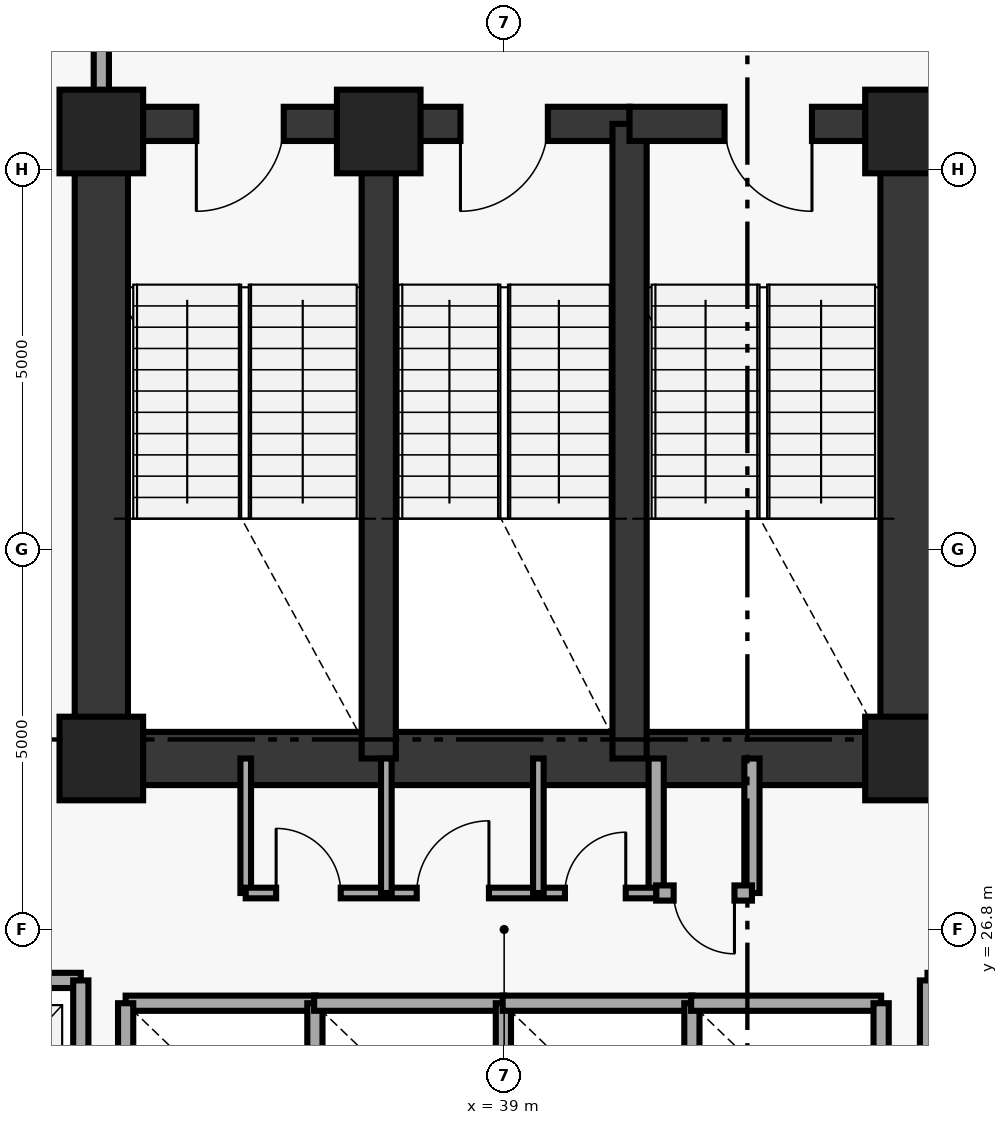
"""IFC4 building model, lengths in metres.
Left out: names, types, materials, properties, quantities, classifications, styles, units other than length and angle.
Written with IfcOpenShell. Run it as: python <this file> out.ifc"""

import sys

from ifc_helpers import new_model, si_unit, direction, frame, frame_2d, origin, origin_2d, place, context, subcontext, project, spatial, rectangle, extrude, element, fill, save


model = new_model("IFC4")
c1 = context("Model", 3, precision=1e-05, world=origin(), true_north=direction((0.0, 1.0)))
c2 = subcontext(c1, "Body", "Model", "MODEL_VIEW")
j1 = project(units=[si_unit("LENGTHUNIT", "METRE"), si_unit("PLANEANGLEUNIT", "RADIAN")], contexts=[c1])
p1 = place(None, origin())
s1 = spatial("IfcSite", under=j1, at=p1, CompositionType="ELEMENT")
p2 = place(p1, origin())
s2 = spatial("IfcBuilding", under=s1, at=p2, CompositionType="ELEMENT")
p3 = place(p2, frame((0.0, 0.0, 102.0)))
s3 = spatial("IfcBuildingStorey", under=s2, at=p3, CompositionType="ELEMENT", Elevation=102.0)
for number, where, z_axis, x_axis in (
    (1, (44.3, 29.05, 0.0), (0.0, 0.0, 1.0), (1.0, 0.0, 0.0)),
    (2, (44.3, 37.3, 0.0), (0.0, 0.0, 1.0), (1.0, 0.0, 0.0)),
    (3, (37.35, 37.3, 0.0), (0.0, 0.0, 1.0), (1.0, 0.0, 0.0)),
    (4, (33.7, 37.3, 0.0), (0.0, 0.0, 1.0), (1.0, 0.0, 0.0)),
    (5, (33.7, 29.05, 0.0), (0.0, 0.0, 1.0), (1.0, 0.0, 0.0)),
):
    element("IfcColumn", number, at=place(p3, frame(where, z_axis=z_axis, x_axis=x_axis)), inside=s3, PredefinedType="PILASTER", context=c2, shape_type="SweptSolid", body=[
        extrude(rectangle(XDim=1.1, YDim=1.1, at=origin_2d()), origin(), (0.0, 0.0, 1.0), 3.7),
    ])
for number, where, z_axis, x_axis in (
    (6, (33.7, 29.05, 0.0), (0.0, 0.0, 1.0), (0.0, 1.0, 0.0)),
    (7, (44.3, 29.05, 0.0), (0.0, 0.0, 1.0), (0.0, 1.0, 0.0)),
):
    element("IfcWall", number, at=place(p3, frame(where, z_axis=z_axis, x_axis=x_axis)), inside=s3, PredefinedType="SHEAR", context=c2, shape_type="SweptSolid", body=[
        extrude(rectangle(XDim=8.35, YDim=0.7, at=frame_2d((4.175, 0.0))), origin(), (0.0, 0.0, 1.0), 3.7),
    ])
p4 = place(p3, frame((33.7, 29.05, 0.0), z_axis=(0.0, 0.0, 1.0), x_axis=(1.0, 0.0, 0.0)))
e8 = element("IfcWall", 8, at=p4, inside=s3, PredefinedType="SHEAR", context=c2, shape_type="SweptSolid", body=[
    extrude(rectangle(XDim=10.6, YDim=0.7, at=frame_2d((5.3, 0.0))), origin(), (0.0, 0.0, 1.0), 3.7),
])
p5 = place(p3, frame((37.35, 37.4, 0.0), z_axis=(0.0, 0.0, 1.0), x_axis=(-1.0, 0.0, 0.0)))
e9 = element("IfcWall", 9, at=p5, inside=s3, PredefinedType="SHEAR", context=c2, shape_type="SweptSolid", body=[
    extrude(rectangle(XDim=3.65, YDim=0.45, at=frame_2d((1.825, 0.0))), origin(), (0.0, 0.0, 1.0), 3.7),
])
p6 = place(p5, frame((1.25, 0.0, 0.0)))
e10 = element("IfcOpeningElement", 10, at=p6, cuts=e9, PredefinedType="OPENING", context=c2, shape_type="SweptSolid", body=[
    extrude(rectangle(XDim=1.15, YDim=2.15, at=frame_2d((0.575, 1.075))), frame((0.0, 0.235, 0.0), z_axis=(0.0, -1.0, 0.0), x_axis=(1.0, 0.0, 0.0)), (0.0, 0.0, 1.0), 0.47),
])
p7 = place(p3, frame((37.35, 29.05, 0.0), z_axis=(0.0, 0.0, 1.0), x_axis=(0.0, 1.0, 0.0)))
e11 = element("IfcWall", 11, at=p7, inside=s3, PredefinedType="SHEAR", context=c2, shape_type="SweptSolid", body=[
    extrude(rectangle(XDim=8.35, YDim=0.45, at=frame_2d((4.175, 0.0))), origin(), (0.0, 0.0, 1.0), 3.7),
])
p8 = place(p3, frame((40.65, 37.4, 0.0), z_axis=(0.0, 0.0, 1.0), x_axis=(-1.0, 0.0, 0.0)))
e12 = element("IfcWall", 12, at=p8, inside=s3, PredefinedType="SHEAR", context=c2, shape_type="SweptSolid", body=[
    extrude(rectangle(XDim=3.3, YDim=0.45, at=frame_2d((1.65, 0.0))), origin(), (0.0, 0.0, 1.0), 3.7),
])
p9 = place(p8, frame((1.075, 0.0, 0.0)))
e13 = element("IfcOpeningElement", 13, at=p9, cuts=e12, PredefinedType="OPENING", context=c2, shape_type="SweptSolid", body=[
    extrude(rectangle(XDim=1.15, YDim=2.15, at=frame_2d((0.575, 1.075))), frame((0.0, 0.235, 0.0), z_axis=(0.0, -1.0, 0.0), x_axis=(1.0, 0.0, 0.0)), (0.0, 0.0, 1.0), 0.47),
])
p10 = place(p3, frame((40.65, 29.05, 0.0), z_axis=(0.0, 0.0, 1.0), x_axis=(0.0, 1.0, 0.0)))
e14 = element("IfcWall", 14, at=p10, inside=s3, PredefinedType="SHEAR", context=c2, shape_type="SweptSolid", body=[
    extrude(rectangle(XDim=8.35, YDim=0.45, at=frame_2d((4.175, 0.0))), origin(), (0.0, 0.0, 1.0), 3.7),
])
p11 = place(p3, frame((44.3, 37.4, 0.0), z_axis=(0.0, 0.0, 1.0), x_axis=(-1.0, 0.0, 0.0)))
e15 = element("IfcWall", 15, at=p11, inside=s3, PredefinedType="SHEAR", context=c2, shape_type="SweptSolid", body=[
    extrude(rectangle(XDim=3.65, YDim=0.45, at=frame_2d((1.825, 0.0))), origin(), (0.0, 0.0, 1.0), 3.7),
])
p12 = place(p11, frame((1.25, 0.0, 0.0)))
e16 = element("IfcOpeningElement", 16, at=p12, cuts=e15, PredefinedType="OPENING", context=c2, shape_type="SweptSolid", body=[
    extrude(rectangle(XDim=1.15, YDim=2.15, at=frame_2d((0.575, 1.075))), frame((0.0, 0.235, 0.0), z_axis=(0.0, -1.0, 0.0), x_axis=(1.0, 0.0, 0.0)), (0.0, 0.0, 1.0), 0.47),
])
p13 = place(p3, frame((33.7, 37.4, 0.0), z_axis=(0.0, 0.0, 1.0), x_axis=(0.0, 1.0, 0.0)))
e17 = element("IfcWall", 17, at=p13, inside=s3, PredefinedType="SOLIDWALL", context=c2, shape_type="SweptSolid", body=[
    extrude(rectangle(XDim=1.88, YDim=0.2, at=frame_2d((0.94, 0.0))), origin(), (0.0, 0.0, 1.0), 3.7),
])
p14 = place(p3, frame((35.6, 27.28, 0.0), z_axis=(0.0, 0.0, 1.0), x_axis=(0.0, 1.0, 0.0)))
e18 = element("IfcWall", 18, at=p14, inside=s3, PredefinedType="PARTITIONING", context=c2, shape_type="SweptSolid", body=[
    extrude(rectangle(XDim=1.77, YDim=0.14, at=frame_2d((0.885, 0.0))), origin(), (0.0, 0.0, 1.0), 3.7),
])
for number, where, z_axis, x_axis in (
    (19, (41.0, 27.28, 0.0), (0.0, 0.0, 1.0), (0.0, 1.0, 0.0)),
    (20, (42.26, 27.28, 0.0), (0.0, 0.0, 1.0), (0.0, 1.0, 0.0)),
):
    element("IfcWall", number, at=place(p3, frame(where, z_axis=z_axis, x_axis=x_axis)), inside=s3, PredefinedType="SOLIDWALL", context=c2, shape_type="SweptSolid", body=[
        extrude(rectangle(XDim=1.77, YDim=0.2, at=frame_2d((0.885, 0.0))), origin(), (0.0, 0.0, 1.0), 3.7),
    ])
p15 = place(p3, frame((41.0, 27.28, 0.0), z_axis=(0.0, 0.0, 1.0), x_axis=(1.0, 0.0, 0.0)))
e21 = element("IfcWall", 21, at=p15, inside=s3, PredefinedType="SOLIDWALL", context=c2, shape_type="SweptSolid", body=[
    extrude(rectangle(XDim=1.26, YDim=0.2, at=frame_2d((0.63, 0.0))), origin(), (0.0, 0.0, 1.0), 3.7),
])
p16 = place(p15, frame((0.23, 0.0, 0.0)))
e22 = element("IfcOpeningElement", 22, at=p16, cuts=e21, PredefinedType="OPENING", context=c2, shape_type="SweptSolid", body=[
    extrude(rectangle(XDim=0.8, YDim=2.05, at=frame_2d((0.4, 1.025))), frame((0.0, 0.11, 0.0), z_axis=(0.0, -1.0, 0.0), x_axis=(1.0, 0.0, 0.0)), (0.0, 0.0, 1.0), 0.22),
])
p17 = place(p3, frame((31.32, 26.13, 0.0), z_axis=(0.0, 0.0, 1.0), x_axis=(1.0, 0.0, 0.0)))
e23 = element("IfcWall", 23, at=p17, inside=s3, PredefinedType="SOLIDWALL", context=c2, shape_type="SweptSolid", body=[
    extrude(rectangle(XDim=2.11, YDim=0.2, at=frame_2d((1.055, 0.0))), origin(), (0.0, 0.0, 1.0), 3.7),
])
p18 = place(p3, frame((33.43, 23.72, 0.0), z_axis=(0.0, 0.0, 1.0), x_axis=(0.0, 1.0, 0.0)))
e24 = element("IfcWall", 24, at=p18, inside=s3, PredefinedType="SOLIDWALL", context=c2, shape_type="SweptSolid", body=[
    extrude(rectangle(XDim=2.41, YDim=0.2, at=frame_2d((1.205, 0.0))), origin(), (0.0, 0.0, 1.0), 3.7),
])
p19 = place(p3, frame((44.57, 26.13, 0.0), z_axis=(0.0, 0.0, 1.0), x_axis=(1.0, 0.0, 0.0)))
e25 = element("IfcWall", 25, at=p19, inside=s3, PredefinedType="SOLIDWALL", context=c2, shape_type="SweptSolid", body=[
    extrude(rectangle(XDim=2.11, YDim=0.2, at=frame_2d((1.055, 0.0))), origin(), (0.0, 0.0, 1.0), 3.7),
])
p20 = place(p3, frame((44.57, 23.72, 0.0), z_axis=(0.0, 0.0, 1.0), x_axis=(0.0, 1.0, 0.0)))
e26 = element("IfcWall", 26, at=p20, inside=s3, PredefinedType="SOLIDWALL", context=c2, shape_type="SweptSolid", body=[
    extrude(rectangle(XDim=2.41, YDim=0.2, at=frame_2d((1.205, 0.0))), origin(), (0.0, 0.0, 1.0), 3.7),
])
p21 = place(p3, frame((34.02, 25.83, 0.0), z_axis=(0.0, 0.0, 1.0), x_axis=(1.0, 0.0, 0.0)))
e27 = element("IfcWall", 27, at=p21, inside=s3, PredefinedType="SOLIDWALL", context=c2, shape_type="SweptSolid", body=[
    extrude(rectangle(XDim=2.5, YDim=0.2, at=frame_2d((1.25, 0.0))), origin(), (0.0, 0.0, 1.0), 3.7),
])
for number, where, z_axis, x_axis in (
    (28, (34.02, 23.42, 0.0), (0.0, 0.0, 1.0), (0.0, 1.0, 0.0)),
    (29, (36.51, 23.42, 0.0), (0.0, 0.0, 1.0), (0.0, 1.0, 0.0)),
):
    element("IfcWall", number, at=place(p3, frame(where, z_axis=z_axis, x_axis=x_axis)), inside=s3, PredefinedType="SOLIDWALL", context=c2, shape_type="SweptSolid", body=[
        extrude(rectangle(XDim=2.41, YDim=0.2, at=frame_2d((1.205, 0.0))), origin(), (0.0, 0.0, 1.0), 3.7),
    ])
p22 = place(p3, frame((36.5, 25.83, 0.0), z_axis=(0.0, 0.0, 1.0), x_axis=(1.0, 0.0, 0.0)))
e30 = element("IfcWall", 30, at=p22, inside=s3, PredefinedType="SOLIDWALL", context=c2, shape_type="SweptSolid", body=[
    extrude(rectangle(XDim=2.5, YDim=0.2, at=frame_2d((1.25, 0.0))), origin(), (0.0, 0.0, 1.0), 3.7),
])
p23 = place(p3, frame((38.99, 23.42, 0.0), z_axis=(0.0, 0.0, 1.0), x_axis=(0.0, 1.0, 0.0)))
e31 = element("IfcWall", 31, at=p23, inside=s3, PredefinedType="SOLIDWALL", context=c2, shape_type="SweptSolid", body=[
    extrude(rectangle(XDim=2.41, YDim=0.2, at=frame_2d((1.205, 0.0))), origin(), (0.0, 0.0, 1.0), 3.7),
])
p24 = place(p3, frame((38.98, 25.83, 0.0), z_axis=(0.0, 0.0, 1.0), x_axis=(1.0, 0.0, 0.0)))
e32 = element("IfcWall", 32, at=p24, inside=s3, PredefinedType="SOLIDWALL", context=c2, shape_type="SweptSolid", body=[
    extrude(rectangle(XDim=2.5, YDim=0.2, at=frame_2d((1.25, 0.0))), origin(), (0.0, 0.0, 1.0), 3.7),
])
p25 = place(p3, frame((41.47, 23.42, 0.0), z_axis=(0.0, 0.0, 1.0), x_axis=(0.0, 1.0, 0.0)))
e33 = element("IfcWall", 33, at=p25, inside=s3, PredefinedType="SOLIDWALL", context=c2, shape_type="SweptSolid", body=[
    extrude(rectangle(XDim=2.41, YDim=0.2, at=frame_2d((1.205, 0.0))), origin(), (0.0, 0.0, 1.0), 3.7),
])
p26 = place(p3, frame((41.46, 25.83, 0.0), z_axis=(0.0, 0.0, 1.0), x_axis=(1.0, 0.0, 0.0)))
e34 = element("IfcWall", 34, at=p26, inside=s3, PredefinedType="SOLIDWALL", context=c2, shape_type="SweptSolid", body=[
    extrude(rectangle(XDim=2.5, YDim=0.2, at=frame_2d((1.25, 0.0))), origin(), (0.0, 0.0, 1.0), 3.7),
])
p27 = place(p3, frame((43.96, 23.42, 0.0), z_axis=(0.0, 0.0, 1.0), x_axis=(0.0, 1.0, 0.0)))
e35 = element("IfcWall", 35, at=p27, inside=s3, PredefinedType="SOLIDWALL", context=c2, shape_type="SweptSolid", body=[
    extrude(rectangle(XDim=2.41, YDim=0.2, at=frame_2d((1.205, 0.0))), origin(), (0.0, 0.0, 1.0), 3.7),
])
p28 = place(p3, frame((35.6, 27.28, 0.0), z_axis=(0.0, 0.0, 1.0), x_axis=(1.0, 0.0, 0.0)))
e36 = element("IfcWall", 36, at=p28, inside=s3, PredefinedType="PARTITIONING", context=c2, shape_type="SweptSolid", body=[
    extrude(rectangle(XDim=5.4, YDim=0.14, at=frame_2d((2.7, 0.0))), origin(), (0.0, 0.0, 1.0), 3.7),
])
p29 = place(p28, frame((0.4, 0.0, 0.0)))
e37 = element("IfcOpeningElement", 37, at=p29, cuts=e36, PredefinedType="OPENING", context=c2, shape_type="SweptSolid", body=[
    extrude(rectangle(XDim=0.85, YDim=2.1, at=frame_2d((0.425, 1.05))), frame((0.0, 0.08, 0.0), z_axis=(0.0, -1.0, 0.0), x_axis=(1.0, 0.0, 0.0)), (0.0, 0.0, 1.0), 0.16),
])
p30 = place(p28, frame((2.25, 0.0, 0.0)))
e38 = element("IfcOpeningElement", 38, at=p30, cuts=e36, PredefinedType="OPENING", context=c2, shape_type="SweptSolid", body=[
    extrude(rectangle(XDim=0.95, YDim=2.1, at=frame_2d((0.475, 1.05))), frame((0.0, 0.08, 0.0), z_axis=(0.0, -1.0, 0.0), x_axis=(1.0, 0.0, 0.0)), (0.0, 0.0, 1.0), 0.16),
])
p31 = place(p28, frame((4.2, 0.0, 0.0)))
e39 = element("IfcOpeningElement", 39, at=p31, cuts=e36, PredefinedType="OPENING", context=c2, shape_type="SweptSolid", body=[
    extrude(rectangle(XDim=0.8, YDim=2.05, at=frame_2d((0.4, 1.025))), frame((0.0, 0.08, 0.0), z_axis=(0.0, -1.0, 0.0), x_axis=(1.0, 0.0, 0.0)), (0.0, 0.0, 1.0), 0.16),
])
for number, where, z_axis, x_axis in (
    (40, (37.45, 27.28, 0.0), (0.0, 0.0, 1.0), (0.0, 1.0, 0.0)),
    (41, (39.45, 27.28, 0.0), (0.0, 0.0, 1.0), (0.0, 1.0, 0.0)),
):
    element("IfcWall", number, at=place(p3, frame(where, z_axis=z_axis, x_axis=x_axis)), inside=s3, PredefinedType="PARTITIONING", context=c2, shape_type="SweptSolid", body=[
        extrude(rectangle(XDim=1.77, YDim=0.14, at=frame_2d((0.885, 0.0))), origin(), (0.0, 0.0, 1.0), 3.7),
    ])
p32 = place(p6, origin())
e42 = element("IfcDoor", 42, at=p32, inside=s3, OperationType="SINGLE_SWING_RIGHT", PredefinedType="DOOR", context=c2, shape_type="SweptSolid", body=[
    extrude(rectangle(XDim=1.15, YDim=2.15, at=frame_2d((0.575, 1.075))), frame((0.0, 0.025, 0.0), z_axis=(0.0, -1.0, 0.0), x_axis=(1.0, 0.0, 0.0)), (0.0, 0.0, 1.0), 0.05),
])
fill(e10, e42)
p33 = place(p9, origin())
e43 = element("IfcDoor", 43, at=p33, inside=s3, OperationType="SINGLE_SWING_RIGHT", PredefinedType="DOOR", context=c2, shape_type="SweptSolid", body=[
    extrude(rectangle(XDim=1.15, YDim=2.15, at=frame_2d((0.575, 1.075))), frame((0.0, 0.025, 0.0), z_axis=(0.0, -1.0, 0.0), x_axis=(1.0, 0.0, 0.0)), (0.0, 0.0, 1.0), 0.05),
])
fill(e13, e43)
p34 = place(p12, origin())
e44 = element("IfcDoor", 44, at=p34, inside=s3, OperationType="SINGLE_SWING_LEFT", PredefinedType="DOOR", context=c2, shape_type="SweptSolid", body=[
    extrude(rectangle(XDim=1.15, YDim=2.15, at=frame_2d((0.575, 1.075))), frame((0.0, 0.025, 0.0), z_axis=(0.0, -1.0, 0.0), x_axis=(1.0, 0.0, 0.0)), (0.0, 0.0, 1.0), 0.05),
])
fill(e16, e44)
p35 = place(p16, origin())
e45 = element("IfcDoor", 45, at=p35, inside=s3, OperationType="SINGLE_SWING_RIGHT", PredefinedType="DOOR", context=c2, shape_type="SweptSolid", body=[
    extrude(rectangle(XDim=0.8, YDim=2.05, at=frame_2d((0.4, 1.025))), frame((0.0, 0.025, 0.0), z_axis=(0.0, -1.0, 0.0), x_axis=(1.0, 0.0, 0.0)), (0.0, 0.0, 1.0), 0.05),
])
fill(e22, e45)
p36 = place(p29, origin())
e46 = element("IfcDoor", 46, at=p36, inside=s3, OperationType="SINGLE_SWING_LEFT", PredefinedType="DOOR", context=c2, shape_type="SweptSolid", body=[
    extrude(rectangle(XDim=0.85, YDim=2.1, at=frame_2d((0.425, 1.05))), frame((0.0, 0.025, 0.0), z_axis=(0.0, -1.0, 0.0), x_axis=(1.0, 0.0, 0.0)), (0.0, 0.0, 1.0), 0.05),
])
fill(e37, e46)
p37 = place(p30, origin())
e47 = element("IfcDoor", 47, at=p37, inside=s3, OperationType="SINGLE_SWING_RIGHT", PredefinedType="DOOR", context=c2, shape_type="SweptSolid", body=[
    extrude(rectangle(XDim=0.95, YDim=2.1, at=frame_2d((0.475, 1.05))), frame((0.0, 0.025, 0.0), z_axis=(0.0, -1.0, 0.0), x_axis=(1.0, 0.0, 0.0)), (0.0, 0.0, 1.0), 0.05),
])
fill(e38, e47)
p38 = place(p31, origin())
e48 = element("IfcDoor", 48, at=p38, inside=s3, OperationType="SINGLE_SWING_RIGHT", PredefinedType="DOOR", context=c2, shape_type="SweptSolid", body=[
    extrude(rectangle(XDim=0.8, YDim=2.05, at=frame_2d((0.4, 1.025))), frame((0.0, 0.025, 0.0), z_axis=(0.0, -1.0, 0.0), x_axis=(1.0, 0.0, 0.0)), (0.0, 0.0, 1.0), 0.05),
])
fill(e39, e48)
save(model, sys.argv[1])
